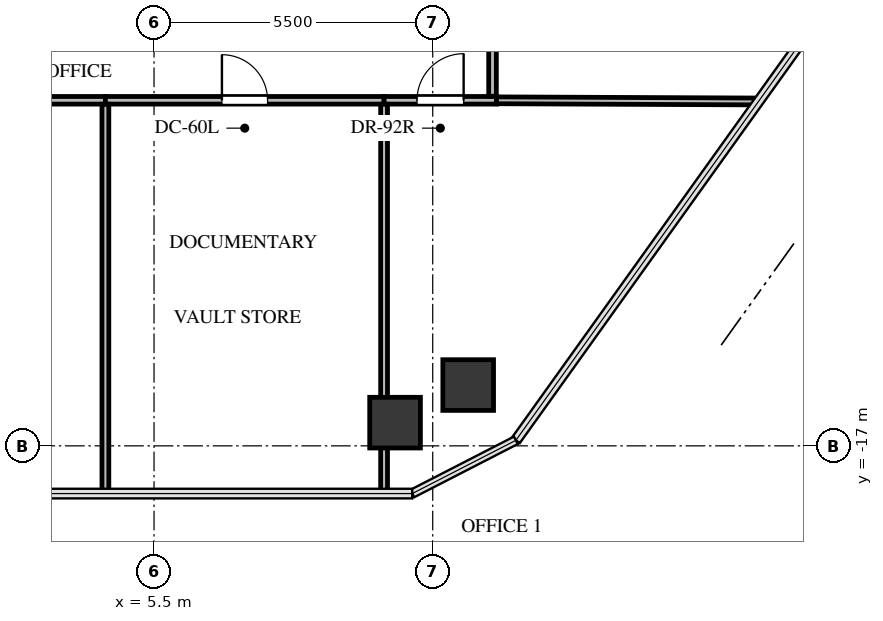
"""IFC4 building model, lengths in metres.
Left out: names, types, materials, properties, quantities, classifications, styles, units other than length and angle.
Written with IfcOpenShell. Run it as: python <this file> out.ifc"""

import sys

from ifc_helpers import new_model, si_unit, direction, frame, frame_2d, origin, origin_2d, place, context, subcontext, project, spatial, rectangle, extrude, source, transform, mapped, element, fill, save


model = new_model("IFC4")
c1 = context("Model", 3, precision=1e-05, world=origin(), true_north=direction((0.0, 1.0)))
c2 = subcontext(c1, "Body", "Model", "MODEL_VIEW")
j1 = project(units=[si_unit("LENGTHUNIT", "METRE"), si_unit("PLANEANGLEUNIT", "RADIAN")], contexts=[c1])
p1 = place(None, origin())
s1 = spatial("IfcSite", under=j1, at=p1, CompositionType="ELEMENT")
p2 = place(p1, origin())
s2 = spatial("IfcBuilding", under=s1, at=p2, CompositionType="ELEMENT")
p3 = place(p2, frame((0.0, 0.0, 173.8)))
s3 = spatial("IfcBuildingStorey", under=s2, at=p3, CompositionType="ELEMENT", Elevation=173.8)
m1 = source(origin(), c2, "Body", "SweptSolid", [
    extrude(rectangle(XDim=1.0, YDim=1.0, at=origin_2d()), origin(), (0.0, 0.0, 1.0), 3.3),
])
for number, where, z_axis, x_axis in (
    (1, (11.7, -15.8, -0.24), (0.0, 0.0, 1.0), (1.0, 0.0, 0.0)),
    (2, (10.257, -16.542, -0.24), (0.0, 0.0, 1.0), (1.0, 0.0, 0.0)),
):
    element("IfcColumn", number, at=place(p3, frame(where, z_axis=z_axis, x_axis=x_axis)), inside=s3, PredefinedType="COLUMN", context=c2, shape_type="MappedRepresentation", body=[
        mapped(m1, transform((0.0, 0.0, 0.0), x_axis=(1.0, 0.0, 0.0), y_axis=(0.0, 1.0, 0.0), z_axis=(0.0, 0.0, 1.0), scale=1.0)),
    ])
p4 = place(p3, frame((1.089, -10.18, 0.0), z_axis=(0.0, 0.0, 1.0), x_axis=(1.0, 0.0, 0.0)))
e3 = element("IfcWall", 3, at=p4, inside=s3, PredefinedType="PARTITIONING", context=c2, shape_type="SweptSolid", body=[
    extrude(rectangle(XDim=3.451, YDim=0.15, at=frame_2d((1.726, 0.0))), origin(), (0.0, 0.0, 1.0), 2.242),
])
p5 = place(p3, frame((4.54, -10.18, 0.0), z_axis=(0.0, 0.0, 1.0), x_axis=(1.0, 0.0, 0.0)))
e4 = element("IfcWall", 4, at=p5, inside=s3, PredefinedType="PARTITIONING", context=c2, shape_type="SweptSolid", body=[
    extrude(rectangle(XDim=5.5, YDim=0.15, at=frame_2d((2.75, 0.0))), origin(), (0.0, 0.0, 1.0), 2.242),
])
p6 = place(p5, frame((2.3, 0.0, 0.0)))
e5 = element("IfcOpeningElement", 5, at=p6, cuts=e4, PredefinedType="OPENING", context=c2, shape_type="SweptSolid", body=[
    extrude(rectangle(XDim=0.9, YDim=2.05, at=frame_2d((0.45, 1.025))), frame((0.0, 0.085, 0.0), z_axis=(0.0, -1.0, 0.0), x_axis=(1.0, 0.0, 0.0)), (0.0, 0.0, 1.0), 0.17),
])
p7 = place(p3, frame((10.04, -10.18, 0.0), z_axis=(0.0, 0.0, 1.0), x_axis=(1.0, 0.0, 0.0)))
e6 = element("IfcWall", 6, at=p7, inside=s3, PredefinedType="PARTITIONING", context=c2, shape_type="SweptSolid", body=[
    extrude(rectangle(XDim=2.22, YDim=0.15, at=frame_2d((1.11, 0.0))), origin(), (0.0, 0.0, 1.0), 3.045),
])
p8 = place(p7, frame((0.65, 0.0, 0.0)))
e7 = element("IfcOpeningElement", 7, at=p8, cuts=e6, PredefinedType="OPENING", context=c2, shape_type="SweptSolid", body=[
    extrude(rectangle(XDim=0.92, YDim=2.1, at=frame_2d((0.46, 1.05))), frame((0.0, 0.085, 0.0), z_axis=(0.0, -1.0, 0.0), x_axis=(1.0, 0.0, 0.0)), (0.0, 0.0, 1.0), 0.17),
])
p9 = place(p3, frame((12.18, -10.101, 0.0), z_axis=(0.0, 0.0, 1.0), x_axis=(0.0, 1.0, 0.0)))
e8 = element("IfcWall", 8, at=p9, inside=s3, PredefinedType="PARTITIONING", context=c2, shape_type="SweptSolid", body=[
    extrude(rectangle(XDim=1.661, YDim=0.15, at=frame_2d((0.831, 0.0))), origin(), (0.0, 0.0, 1.0), 3.045),
])
p10 = place(p3, frame((4.54, -10.259, 0.0), z_axis=(0.0, 0.0, 1.0), x_axis=(0.0, -1.0, 0.0)))
e9 = element("IfcWall", 9, at=p10, inside=s3, PredefinedType="PARTITIONING", context=c2, shape_type="SweptSolid", body=[
    extrude(rectangle(XDim=7.683, YDim=0.135, at=frame_2d((3.841, 0.0))), origin(), (0.0, 0.0, 1.0), 2.399),
])
p11 = place(p3, frame((10.04, -10.259, 0.0), z_axis=(0.0, 0.0, 1.0), x_axis=(0.0, -1.0, 0.0)))
e10 = element("IfcWall", 10, at=p11, inside=s3, PredefinedType="PARTITIONING", context=c2, shape_type="SweptSolid", body=[
    extrude(rectangle(XDim=6.367, YDim=0.135, at=frame_2d((3.184, 0.0))), origin(), (0.0, 0.0, 1.0), 2.242),
])
p12 = place(p3, frame((10.04, -16.626, 0.0), z_axis=(0.0, 0.0, 1.0), x_axis=(0.0, -1.0, 0.0)))
e11 = element("IfcWall", 11, at=p12, inside=s3, PredefinedType="PARTITIONING", context=c2, shape_type="SweptSolid", body=[
    extrude(rectangle(XDim=1.316, YDim=0.135, at=frame_2d((0.658, 0.0))), origin(), (0.0, 0.0, 1.0), 1.877),
])
p13 = place(p3, frame((12.26, -10.18, 0.0), z_axis=(0.0, 0.0, 1.0), x_axis=(0.999990144117, -0.004439782427, 0.0)))
e12 = element("IfcWall", 12, at=p13, inside=s3, PredefinedType="PARTITIONING", context=c2, shape_type="SweptSolid", body=[
    extrude(rectangle(XDim=5.169, YDim=0.135, at=frame_2d((2.584, 0.0))), origin(), (0.0, 0.0, 1.0), 2.399),
])
m2 = source(origin(), c2, "Body", "SweptSolid", [
    extrude(rectangle(XDim=0.9, YDim=2.05, at=frame_2d((0.45, 1.025))), frame((0.0, 0.025, 0.0), z_axis=(0.0, -1.0, 0.0), x_axis=(1.0, 0.0, 0.0)), (0.0, 0.0, 1.0), 0.05),
])
p14 = place(p6, origin())
e13 = element("IfcDoor", 13, at=p14, inside=s3, OperationType="SINGLE_SWING_LEFT", PredefinedType="DOOR", context=c2, shape_type="MappedRepresentation", body=[
    mapped(m2, transform((0.0, 0.0, 0.0), x_axis=(1.0, 0.0, 0.0), y_axis=(0.0, 1.0, 0.0), z_axis=(0.0, 0.0, 1.0), scale=1.0)),
])
fill(e5, e13)
m3 = source(origin(), c2, "Body", "SweptSolid", [
    extrude(rectangle(XDim=0.92, YDim=2.1, at=frame_2d((0.46, 1.05))), frame((0.0, 0.025, 0.0), z_axis=(0.0, -1.0, 0.0), x_axis=(1.0, 0.0, 0.0)), (0.0, 0.0, 1.0), 0.05),
])
p15 = place(p8, origin())
e14 = element("IfcDoor", 14, at=p15, inside=s3, OperationType="SINGLE_SWING_RIGHT", PredefinedType="DOOR", context=c2, shape_type="MappedRepresentation", body=[
    mapped(m3, transform((0.0, 0.0, 0.0), x_axis=(1.0, 0.0, 0.0), y_axis=(0.0, 1.0, 0.0), z_axis=(0.0, 0.0, 1.0), scale=1.0)),
])
fill(e7, e14)
save(model, sys.argv[1])
